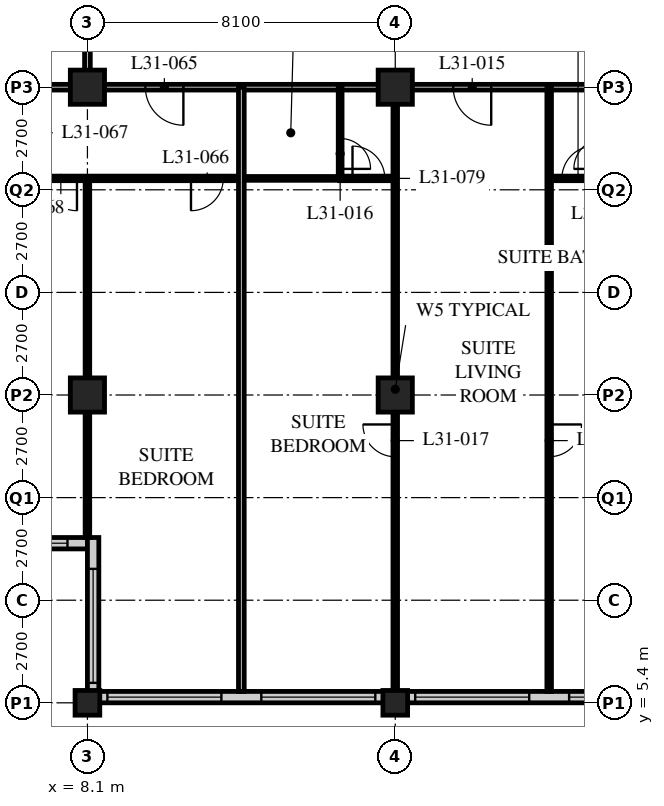
"""IFC4 building model, lengths in metres.
Left out: names, types, materials, properties, quantities, classifications, styles, units other than length and angle.
Written with IfcOpenShell. Run it as: python <this file> out.ifc"""

import sys

from ifc_helpers import new_model, si_unit, direction, frame, frame_2d, origin, origin_2d, place, context, subcontext, project, spatial, rectangle, hollow_rectangle, extrude, element, fill, save


model = new_model("IFC4")
c1 = context("Model", 3, precision=1e-05, world=origin(), true_north=direction((0.0, 1.0)))
c2 = subcontext(c1, "Body", "Model", "MODEL_VIEW")
j1 = project(units=[si_unit("LENGTHUNIT", "METRE"), si_unit("PLANEANGLEUNIT", "RADIAN")], contexts=[c1])
p1 = place(None, origin())
s1 = spatial("IfcSite", under=j1, at=p1, CompositionType="ELEMENT")
p2 = place(p1, origin())
s2 = spatial("IfcBuilding", under=s1, at=p2, CompositionType="ELEMENT")
p3 = place(p2, frame((0.0, 0.0, 123.8)))
s3 = spatial("IfcBuildingStorey", under=s2, at=p3, CompositionType="ELEMENT", Elevation=123.8)
p4 = place(p3, frame((8.1, 5.4, 0.0), z_axis=(0.0, 0.0, 1.0), x_axis=(1.0, 0.0, 0.0)))
e1 = element("IfcColumn", 1, at=p4, inside=s3, PredefinedType="COLUMN", context=c2, shape_type="SweptSolid", body=[
    extrude(hollow_rectangle(XDim=0.65, YDim=0.65, WallThickness=0.055, at=origin_2d()), origin(), (0.0, 0.0, 1.0), 3.4),
])
for number, where, z_axis, x_axis in (
    (2, (8.1, 13.5, 0.0), (0.0, 0.0, 1.0), (1.0, 0.0, 0.0)),
    (3, (8.1, 21.6, 0.0), (0.0, 0.0, 1.0), (1.0, 0.0, 0.0)),
):
    element("IfcColumn", number, at=place(p3, frame(where, z_axis=z_axis, x_axis=x_axis)), inside=s3, PredefinedType="COLUMN", context=c2, shape_type="SweptSolid", body=[
        extrude(hollow_rectangle(XDim=0.9, YDim=0.9, WallThickness=0.09, at=origin_2d()), origin(), (0.0, 0.0, 1.0), 3.4),
    ])
p5 = place(p3, frame((16.2, 5.4, 0.0), z_axis=(0.0, 0.0, 1.0), x_axis=(1.0, 0.0, 0.0)))
e4 = element("IfcColumn", 4, at=p5, inside=s3, PredefinedType="COLUMN", context=c2, shape_type="SweptSolid", body=[
    extrude(hollow_rectangle(XDim=0.65, YDim=0.65, WallThickness=0.055, at=origin_2d()), origin(), (0.0, 0.0, 1.0), 3.4),
])
for number, where, z_axis, x_axis in (
    (5, (16.2, 13.5, 0.0), (0.0, 0.0, 1.0), (1.0, 0.0, 0.0)),
    (6, (16.2, 21.6, 0.0), (0.0, 0.0, 1.0), (1.0, 0.0, 0.0)),
):
    element("IfcColumn", number, at=place(p3, frame(where, z_axis=z_axis, x_axis=x_axis)), inside=s3, PredefinedType="COLUMN", context=c2, shape_type="SweptSolid", body=[
        extrude(hollow_rectangle(XDim=0.9, YDim=0.9, WallThickness=0.09, at=origin_2d()), origin(), (0.0, 0.0, 1.0), 3.4),
    ])
p6 = place(p3, frame((8.4, 5.55, 0.0), z_axis=(0.0, 0.0, 1.0), x_axis=(1.0, 0.0, 0.0)))
e7 = element("IfcWall", 7, at=p6, inside=s3, PredefinedType="SOLIDWALL", context=c2, shape_type="SweptSolid", body=[
    extrude(rectangle(XDim=40.2, YDim=0.3, at=frame_2d((20.1, 0.0))), origin(), (0.0, 0.0, 1.0), 3.19),
])
p7 = place(p6, frame((0.225, 0.0, 0.9)))
e8 = element("IfcOpeningElement", 8, at=p7, cuts=e7, PredefinedType="OPENING", context=c2, shape_type="SweptSolid", body=[
    extrude(rectangle(XDim=3.0, YDim=2.0, at=frame_2d((1.5, 1.0))), frame((0.0, 0.16, 0.0), z_axis=(0.0, -1.0, 0.0), x_axis=(1.0, 0.0, 0.0)), (0.0, 0.0, 1.0), 0.32),
])
p8 = place(p6, frame((4.275, 0.0, 0.9)))
e9 = element("IfcOpeningElement", 9, at=p8, cuts=e7, PredefinedType="OPENING", context=c2, shape_type="SweptSolid", body=[
    extrude(rectangle(XDim=3.0, YDim=2.0, at=frame_2d((1.5, 1.0))), frame((0.0, 0.16, 0.0), z_axis=(0.0, -1.0, 0.0), x_axis=(1.0, 0.0, 0.0)), (0.0, 0.0, 1.0), 0.32),
])
p9 = place(p6, frame((8.325, 0.0, 0.9)))
e10 = element("IfcOpeningElement", 10, at=p9, cuts=e7, PredefinedType="OPENING", context=c2, shape_type="SweptSolid", body=[
    extrude(rectangle(XDim=3.0, YDim=2.0, at=frame_2d((1.5, 1.0))), frame((0.0, 0.16, 0.0), z_axis=(0.0, -1.0, 0.0), x_axis=(1.0, 0.0, 0.0)), (0.0, 0.0, 1.0), 0.32),
])
p10 = place(p6, frame((12.375, 0.0, 0.9)))
e11 = element("IfcOpeningElement", 11, at=p10, cuts=e7, PredefinedType="OPENING", context=c2, shape_type="SweptSolid", body=[
    extrude(rectangle(XDim=3.0, YDim=2.0, at=frame_2d((1.5, 1.0))), frame((0.0, 0.16, 0.0), z_axis=(0.0, -1.0, 0.0), x_axis=(1.0, 0.0, 0.0)), (0.0, 0.0, 1.0), 0.32),
])
p11 = place(p6, frame((16.425, 0.0, 0.9)))
e12 = element("IfcOpeningElement", 12, at=p11, cuts=e7, PredefinedType="OPENING", context=c2, shape_type="SweptSolid", body=[
    extrude(rectangle(XDim=3.0, YDim=2.0, at=frame_2d((1.5, 1.0))), frame((0.0, 0.16, 0.0), z_axis=(0.0, -1.0, 0.0), x_axis=(1.0, 0.0, 0.0)), (0.0, 0.0, 1.0), 0.32),
])
p12 = place(p6, frame((20.475, 0.0, 0.9)))
e13 = element("IfcOpeningElement", 13, at=p12, cuts=e7, PredefinedType="OPENING", context=c2, shape_type="SweptSolid", body=[
    extrude(rectangle(XDim=3.0, YDim=2.0, at=frame_2d((1.5, 1.0))), frame((0.0, 0.16, 0.0), z_axis=(0.0, -1.0, 0.0), x_axis=(1.0, 0.0, 0.0)), (0.0, 0.0, 1.0), 0.32),
])
p13 = place(p6, frame((24.525, 0.0, 0.9)))
e14 = element("IfcOpeningElement", 14, at=p13, cuts=e7, PredefinedType="OPENING", context=c2, shape_type="SweptSolid", body=[
    extrude(rectangle(XDim=3.0, YDim=2.0, at=frame_2d((1.5, 1.0))), frame((0.0, 0.16, 0.0), z_axis=(0.0, -1.0, 0.0), x_axis=(1.0, 0.0, 0.0)), (0.0, 0.0, 1.0), 0.32),
])
p14 = place(p6, frame((28.575, 0.0, 0.9)))
e15 = element("IfcOpeningElement", 15, at=p14, cuts=e7, PredefinedType="OPENING", context=c2, shape_type="SweptSolid", body=[
    extrude(rectangle(XDim=3.0, YDim=2.0, at=frame_2d((1.5, 1.0))), frame((0.0, 0.16, 0.0), z_axis=(0.0, -1.0, 0.0), x_axis=(1.0, 0.0, 0.0)), (0.0, 0.0, 1.0), 0.32),
])
p15 = place(p6, frame((32.625, 0.0, 0.9)))
e16 = element("IfcOpeningElement", 16, at=p15, cuts=e7, PredefinedType="OPENING", context=c2, shape_type="SweptSolid", body=[
    extrude(rectangle(XDim=3.0, YDim=2.0, at=frame_2d((1.5, 1.0))), frame((0.0, 0.16, 0.0), z_axis=(0.0, -1.0, 0.0), x_axis=(1.0, 0.0, 0.0)), (0.0, 0.0, 1.0), 0.32),
])
p16 = place(p6, frame((36.675, 0.0, 0.9)))
e17 = element("IfcOpeningElement", 17, at=p16, cuts=e7, PredefinedType="OPENING", context=c2, shape_type="SweptSolid", body=[
    extrude(rectangle(XDim=3.0, YDim=2.0, at=frame_2d((1.5, 1.0))), frame((0.0, 0.16, 0.0), z_axis=(0.0, -1.0, 0.0), x_axis=(1.0, 0.0, 0.0)), (0.0, 0.0, 1.0), 0.32),
])
p17 = place(p3, frame((4.35, 9.6, 0.0), z_axis=(0.0, 0.0, 1.0), x_axis=(1.0, 0.0, 0.0)))
e18 = element("IfcWall", 18, at=p17, inside=s3, PredefinedType="SOLIDWALL", context=c2, shape_type="SweptSolid", body=[
    extrude(rectangle(XDim=3.75, YDim=0.3, at=frame_2d((1.875, 0.0))), origin(), (0.0, 0.0, 1.0), 3.19),
])
p18 = place(p17, frame((0.225, 0.0, 0.9)))
e19 = element("IfcOpeningElement", 19, at=p18, cuts=e18, PredefinedType="OPENING", context=c2, shape_type="SweptSolid", body=[
    extrude(rectangle(XDim=3.0, YDim=1.5, at=frame_2d((1.5, 0.75))), frame((0.0, 0.16, 0.0), z_axis=(0.0, -1.0, 0.0), x_axis=(1.0, 0.0, 0.0)), (0.0, 0.0, 1.0), 0.32),
])
p19 = place(p3, frame((8.25, 9.75, 0.0), z_axis=(0.0, 0.0, 1.0), x_axis=(0.0, -1.0, 0.0)))
e20 = element("IfcWall", 20, at=p19, inside=s3, PredefinedType="SOLIDWALL", context=c2, shape_type="SweptSolid", body=[
    extrude(rectangle(XDim=4.35, YDim=0.3, at=frame_2d((2.175, 0.0))), origin(), (0.0, 0.0, 1.0), 3.19),
])
p20 = place(p19, frame((0.825, 0.0, 0.9)))
e21 = element("IfcOpeningElement", 21, at=p20, cuts=e20, PredefinedType="OPENING", context=c2, shape_type="SweptSolid", body=[
    extrude(rectangle(XDim=3.0, YDim=1.5, at=frame_2d((1.5, 0.75))), frame((0.0, 0.16, 0.0), z_axis=(0.0, -1.0, 0.0), x_axis=(1.0, 0.0, 0.0)), (0.0, 0.0, 1.0), 0.32),
])
p21 = place(p3, frame((8.1, 21.6, 0.0), z_axis=(0.0, 0.0, 1.0), x_axis=(1.0, 0.0, 0.0)))
e22 = element("IfcWall", 22, at=p21, inside=s3, PredefinedType="PARTITIONING", context=c2, shape_type="SweptSolid", body=[
    extrude(rectangle(XDim=40.5, YDim=0.15, at=frame_2d((20.25, 0.0))), origin(), (0.0, 0.0, 1.0), 2.578),
])
p22 = place(p21, frame((9.625, 0.0, 0.0)))
e23 = element("IfcOpeningElement", 23, at=p22, cuts=e22, PredefinedType="OPENING", context=c2, shape_type="SweptSolid", body=[
    extrude(rectangle(XDim=1.0, YDim=2.1, at=frame_2d((0.5, 1.05))), frame((0.0, 0.085, 0.0), z_axis=(0.0, -1.0, 0.0), x_axis=(1.0, 0.0, 0.0)), (0.0, 0.0, 1.0), 0.17),
])
p23 = place(p21, frame((21.775, 0.0, 0.0)))
e24 = element("IfcOpeningElement", 24, at=p23, cuts=e22, PredefinedType="OPENING", context=c2, shape_type="SweptSolid", body=[
    extrude(rectangle(XDim=1.0, YDim=2.1, at=frame_2d((0.5, 1.05))), frame((0.0, 0.085, 0.0), z_axis=(0.0, -1.0, 0.0), x_axis=(1.0, 0.0, 0.0)), (0.0, 0.0, 1.0), 0.17),
])
p24 = place(p21, frame((28.95, 0.0, 0.0)))
e25 = element("IfcOpeningElement", 25, at=p24, cuts=e22, PredefinedType="OPENING", context=c2, shape_type="SweptSolid", body=[
    extrude(rectangle(XDim=1.0, YDim=2.1, at=frame_2d((0.5, 1.05))), frame((0.0, 0.085, 0.0), z_axis=(0.0, -1.0, 0.0), x_axis=(1.0, 0.0, 0.0)), (0.0, 0.0, 1.0), 0.17),
])
p25 = place(p21, frame((34.85, 0.0, 0.0)))
e26 = element("IfcOpeningElement", 26, at=p25, cuts=e22, PredefinedType="OPENING", context=c2, shape_type="SweptSolid", body=[
    extrude(rectangle(XDim=1.0, YDim=2.1, at=frame_2d((0.5, 1.05))), frame((0.0, 0.085, 0.0), z_axis=(0.0, -1.0, 0.0), x_axis=(1.0, 0.0, 0.0)), (0.0, 0.0, 1.0), 0.17),
])
p26 = place(p21, frame((1.525, 0.0, 0.0)))
e27 = element("IfcOpeningElement", 27, at=p26, cuts=e22, PredefinedType="OPENING", context=c2, shape_type="SweptSolid", body=[
    extrude(rectangle(XDim=1.0, YDim=2.1, at=frame_2d((0.5, 1.05))), frame((0.0, 0.085, 0.0), z_axis=(0.0, -1.0, 0.0), x_axis=(1.0, 0.0, 0.0)), (0.0, 0.0, 1.0), 0.17),
])
p27 = place(p21, frame((37.975, 0.0, 0.0)))
e28 = element("IfcOpeningElement", 28, at=p27, cuts=e22, PredefinedType="OPENING", context=c2, shape_type="SweptSolid", body=[
    extrude(rectangle(XDim=1.0, YDim=2.1, at=frame_2d((0.5, 1.05))), frame((0.0, 0.085, 0.0), z_axis=(0.0, -1.0, 0.0), x_axis=(1.0, 0.0, 0.0)), (0.0, 0.0, 1.0), 0.17),
])
p28 = place(p3, frame((8.1, 21.6, 0.0), z_axis=(0.0, 0.0, 1.0), x_axis=(0.0, 1.0, 0.0)))
e29 = element("IfcWall", 29, at=p28, inside=s3, PredefinedType="PARTITIONING", context=c2, shape_type="SweptSolid", body=[
    extrude(rectangle(XDim=24.3, YDim=0.15, at=frame_2d((12.15, 0.0))), origin(), (0.0, 0.0, 1.0), 2.578),
])
p29 = place(p28, frame((5.45, 0.0, 0.0)))
e30 = element("IfcOpeningElement", 30, at=p29, cuts=e29, PredefinedType="OPENING", context=c2, shape_type="SweptSolid", body=[
    extrude(rectangle(XDim=1.0, YDim=2.1, at=frame_2d((0.5, 1.05))), frame((0.0, 0.085, 0.0), z_axis=(0.0, -1.0, 0.0), x_axis=(1.0, 0.0, 0.0)), (0.0, 0.0, 1.0), 0.17),
])
p30 = place(p28, frame((10.0, 0.0, 0.0)))
e31 = element("IfcOpeningElement", 31, at=p30, cuts=e29, PredefinedType="OPENING", context=c2, shape_type="SweptSolid", body=[
    extrude(rectangle(XDim=1.0, YDim=2.1, at=frame_2d((0.5, 1.05))), frame((0.0, 0.085, 0.0), z_axis=(0.0, -1.0, 0.0), x_axis=(1.0, 0.0, 0.0)), (0.0, 0.0, 1.0), 0.17),
])
p31 = place(p28, frame((21.65, 0.0, 0.0)))
e32 = element("IfcOpeningElement", 32, at=p31, cuts=e29, PredefinedType="OPENING", context=c2, shape_type="SweptSolid", body=[
    extrude(rectangle(XDim=1.0, YDim=2.1, at=frame_2d((0.5, 1.05))), frame((0.0, 0.085, 0.0), z_axis=(0.0, -1.0, 0.0), x_axis=(1.0, 0.0, 0.0)), (0.0, 0.0, 1.0), 0.17),
])
p32 = place(p3, frame((12.15, 19.2, 0.0), z_axis=(0.0, 0.0, 1.0), x_axis=(1.0, 0.0, 0.0)))
e33 = element("IfcWall", 33, at=p32, inside=s3, PredefinedType="PARTITIONING", context=c2, shape_type="SweptSolid", body=[
    extrude(rectangle(XDim=2.6, YDim=0.1, at=frame_2d((1.3, 0.0))), origin(), (0.0, 0.0, 1.0), 3.19),
])
p33 = place(p3, frame((14.75, 21.6, 0.0), z_axis=(0.0, 0.0, 1.0), x_axis=(0.0, -1.0, 0.0)))
e34 = element("IfcWall", 34, at=p33, inside=s3, PredefinedType="PARTITIONING", context=c2, shape_type="SweptSolid", body=[
    extrude(rectangle(XDim=2.4, YDim=0.1, at=frame_2d((1.2, 0.0))), origin(), (0.0, 0.0, 1.0), 3.19),
])
p34 = place(p33, frame((1.35, 0.0, 0.0)))
e35 = element("IfcOpeningElement", 35, at=p34, cuts=e34, PredefinedType="OPENING", context=c2, shape_type="SweptSolid", body=[
    extrude(rectangle(XDim=0.8, YDim=2.1, at=frame_2d((0.4, 1.05))), frame((0.0, 0.06, 0.0), z_axis=(0.0, -1.0, 0.0), x_axis=(1.0, 0.0, 0.0)), (0.0, 0.0, 1.0), 0.12),
])
p35 = place(p3, frame((16.2, 21.6, 0.0), z_axis=(0.0, 0.0, 1.0), x_axis=(0.0, -1.0, 0.0)))
e36 = element("IfcWall", 36, at=p35, inside=s3, PredefinedType="PARTITIONING", context=c2, shape_type="SweptSolid", body=[
    extrude(rectangle(XDim=15.9, YDim=0.12, at=frame_2d((7.95, 0.0))), origin(), (0.0, 0.0, 1.0), 2.578),
])
p36 = place(p35, frame((8.875, 0.0, 0.0)))
e37 = element("IfcOpeningElement", 37, at=p36, cuts=e36, PredefinedType="OPENING", context=c2, shape_type="SweptSolid", body=[
    extrude(rectangle(XDim=0.85, YDim=2.1, at=frame_2d((0.425, 1.05))), frame((0.0, 0.07, 0.0), z_axis=(0.0, -1.0, 0.0), x_axis=(1.0, 0.0, 0.0)), (0.0, 0.0, 1.0), 0.14),
])
p37 = place(p3, frame((20.25, 21.6, 0.0), z_axis=(0.0, 0.0, 1.0), x_axis=(0.0, -1.0, 0.0)))
e38 = element("IfcWall", 38, at=p37, inside=s3, PredefinedType="PARTITIONING", context=c2, shape_type="SweptSolid", body=[
    extrude(rectangle(XDim=15.9, YDim=0.12, at=frame_2d((7.95, 0.0))), origin(), (0.0, 0.0, 1.0), 3.19),
])
p38 = place(p37, frame((8.875, 0.0, 0.0)))
e39 = element("IfcOpeningElement", 39, at=p38, cuts=e38, PredefinedType="OPENING", context=c2, shape_type="SweptSolid", body=[
    extrude(rectangle(XDim=0.85, YDim=2.1, at=frame_2d((0.425, 1.05))), frame((0.0, 0.07, 0.0), z_axis=(0.0, -1.0, 0.0), x_axis=(1.0, 0.0, 0.0)), (0.0, 0.0, 1.0), 0.14),
])
p39 = place(p3, frame((4.1, 19.2, 0.0), z_axis=(0.0, 0.0, 1.0), x_axis=(1.0, 0.0, 0.0)))
e40 = element("IfcWall", 40, at=p39, inside=s3, PredefinedType="PARTITIONING", context=c2, shape_type="SweptSolid", body=[
    extrude(rectangle(XDim=8.05, YDim=0.12, at=frame_2d((4.025, 0.0))), origin(), (0.0, 0.0, 1.0), 3.19),
])
p40 = place(p39, frame((6.725, 0.0, 0.0)))
e41 = element("IfcOpeningElement", 41, at=p40, cuts=e40, PredefinedType="OPENING", context=c2, shape_type="SweptSolid", body=[
    extrude(rectangle(XDim=0.85, YDim=2.1, at=frame_2d((0.425, 1.05))), frame((0.0, 0.07, 0.0), z_axis=(0.0, -1.0, 0.0), x_axis=(1.0, 0.0, 0.0)), (0.0, 0.0, 1.0), 0.14),
])
p41 = place(p39, frame((2.875, 0.0, 0.0)))
e42 = element("IfcOpeningElement", 42, at=p41, cuts=e40, PredefinedType="OPENING", context=c2, shape_type="SweptSolid", body=[
    extrude(rectangle(XDim=0.85, YDim=2.1, at=frame_2d((0.425, 1.05))), frame((0.0, 0.07, 0.0), z_axis=(0.0, -1.0, 0.0), x_axis=(1.0, 0.0, 0.0)), (0.0, 0.0, 1.0), 0.14),
])
p42 = place(p3, frame((8.1, 19.2, 0.0), z_axis=(0.0, 0.0, 1.0), x_axis=(0.0, -1.0, 0.0)))
e43 = element("IfcWall", 43, at=p42, inside=s3, PredefinedType="PARTITIONING", context=c2, shape_type="SweptSolid", body=[
    extrude(rectangle(XDim=9.45, YDim=0.12, at=frame_2d((4.725, 0.0))), origin(), (0.0, 0.0, 1.0), 2.578),
])
p43 = place(p3, frame((0.3, 21.6, 0.0), z_axis=(0.0, 0.0, 1.0), x_axis=(1.0, 0.0, 0.0)))
e44 = element("IfcWall", 44, at=p43, inside=s3, PredefinedType="PARTITIONING", context=c2, shape_type="SweptSolid", body=[
    extrude(rectangle(XDim=7.8, YDim=0.15, at=frame_2d((3.9, 0.0))), origin(), (0.0, 0.0, 1.0), 2.578),
])
p44 = place(p3, frame((12.15, 21.6, 0.0), z_axis=(0.0, 0.0, 1.0), x_axis=(0.0, -1.0, 0.0)))
e45 = element("IfcWall", 45, at=p44, inside=s3, PredefinedType="PARTITIONING", context=c2, shape_type="SweptSolid", body=[
    extrude(rectangle(XDim=15.9, YDim=0.15, at=frame_2d((7.95, 0.0))), origin(), (0.0, 0.0, 1.0), 3.19),
])
p45 = place(p3, frame((16.2, 19.2, 0.0), z_axis=(0.0, 0.0, 1.0), x_axis=(-1.0, 0.0, 0.0)))
e46 = element("IfcWall", 46, at=p45, inside=s3, PredefinedType="PARTITIONING", context=c2, shape_type="SweptSolid", body=[
    extrude(rectangle(XDim=1.46, YDim=0.12, at=frame_2d((0.73, 0.0))), origin(), (0.0, 0.0, 1.0), 3.19),
])
p46 = place(p45, frame((0.275, 0.0, 0.0)))
e47 = element("IfcOpeningElement", 47, at=p46, cuts=e46, PredefinedType="OPENING", context=c2, shape_type="SweptSolid", body=[
    extrude(rectangle(XDim=0.85, YDim=2.1, at=frame_2d((0.425, 1.05))), frame((0.0, 0.07, 0.0), z_axis=(0.0, -1.0, 0.0), x_axis=(1.0, 0.0, 0.0)), (0.0, 0.0, 1.0), 0.14),
])
p47 = place(p3, frame((21.71, 19.2, 0.0), z_axis=(0.0, 0.0, 1.0), x_axis=(-1.0, 0.0, 0.0)))
e48 = element("IfcWall", 48, at=p47, inside=s3, PredefinedType="PARTITIONING", context=c2, shape_type="SweptSolid", body=[
    extrude(rectangle(XDim=1.46, YDim=0.12, at=frame_2d((0.73, 0.0))), origin(), (0.0, 0.0, 1.0), 3.19),
])
p48 = place(p47, frame((0.275, 0.0, 0.0)))
e49 = element("IfcOpeningElement", 49, at=p48, cuts=e48, PredefinedType="OPENING", context=c2, shape_type="SweptSolid", body=[
    extrude(rectangle(XDim=0.85, YDim=2.1, at=frame_2d((0.425, 1.05))), frame((0.0, 0.07, 0.0), z_axis=(0.0, -1.0, 0.0), x_axis=(1.0, 0.0, 0.0)), (0.0, 0.0, 1.0), 0.14),
])
p49 = place(p7, origin())
e50 = element("IfcWindow", 50, at=p49, inside=s3, PartitioningType="SINGLE_PANEL", PredefinedType="WINDOW", context=c2, shape_type="SweptSolid", body=[
    extrude(rectangle(XDim=3.0, YDim=2.0, at=frame_2d((1.5, 1.0))), frame((0.0, 0.03, 0.0), z_axis=(0.0, -1.0, 0.0), x_axis=(1.0, 0.0, 0.0)), (0.0, 0.0, 1.0), 0.06),
])
fill(e8, e50)
p50 = place(p8, origin())
e51 = element("IfcWindow", 51, at=p50, inside=s3, PartitioningType="SINGLE_PANEL", PredefinedType="WINDOW", context=c2, shape_type="SweptSolid", body=[
    extrude(rectangle(XDim=3.0, YDim=2.0, at=frame_2d((1.5, 1.0))), frame((0.0, 0.03, 0.0), z_axis=(0.0, -1.0, 0.0), x_axis=(1.0, 0.0, 0.0)), (0.0, 0.0, 1.0), 0.06),
])
fill(e9, e51)
p51 = place(p9, origin())
e52 = element("IfcWindow", 52, at=p51, inside=s3, PartitioningType="SINGLE_PANEL", PredefinedType="WINDOW", context=c2, shape_type="SweptSolid", body=[
    extrude(rectangle(XDim=3.0, YDim=2.0, at=frame_2d((1.5, 1.0))), frame((0.0, 0.03, 0.0), z_axis=(0.0, -1.0, 0.0), x_axis=(1.0, 0.0, 0.0)), (0.0, 0.0, 1.0), 0.06),
])
fill(e10, e52)
p52 = place(p10, origin())
e53 = element("IfcWindow", 53, at=p52, inside=s3, PartitioningType="SINGLE_PANEL", PredefinedType="WINDOW", context=c2, shape_type="SweptSolid", body=[
    extrude(rectangle(XDim=3.0, YDim=2.0, at=frame_2d((1.5, 1.0))), frame((0.0, 0.03, 0.0), z_axis=(0.0, -1.0, 0.0), x_axis=(1.0, 0.0, 0.0)), (0.0, 0.0, 1.0), 0.06),
])
fill(e11, e53)
p53 = place(p18, origin())
e54 = element("IfcWindow", 54, at=p53, inside=s3, PartitioningType="SINGLE_PANEL", PredefinedType="WINDOW", context=c2, shape_type="SweptSolid", body=[
    extrude(rectangle(XDim=3.0, YDim=1.5, at=frame_2d((1.5, 0.75))), frame((0.0, 0.03, 0.0), z_axis=(0.0, -1.0, 0.0), x_axis=(1.0, 0.0, 0.0)), (0.0, 0.0, 1.0), 0.06),
])
fill(e19, e54)
p54 = place(p20, origin())
e55 = element("IfcWindow", 55, at=p54, inside=s3, PartitioningType="SINGLE_PANEL", PredefinedType="WINDOW", context=c2, shape_type="SweptSolid", body=[
    extrude(rectangle(XDim=3.0, YDim=1.5, at=frame_2d((1.5, 0.75))), frame((0.0, 0.03, 0.0), z_axis=(0.0, -1.0, 0.0), x_axis=(1.0, 0.0, 0.0)), (0.0, 0.0, 1.0), 0.06),
])
fill(e21, e55)
p55 = place(p22, origin())
e56 = element("IfcDoor", 56, at=p55, inside=s3, OperationType="SINGLE_SWING_LEFT", PredefinedType="DOOR", context=c2, shape_type="SweptSolid", body=[
    extrude(rectangle(XDim=1.0, YDim=2.1, at=frame_2d((0.5, 1.05))), frame((0.0, 0.025, 0.0), z_axis=(0.0, -1.0, 0.0), x_axis=(1.0, 0.0, 0.0)), (0.0, 0.0, 1.0), 0.05),
])
fill(e23, e56)
p56 = place(p34, origin())
e57 = element("IfcDoor", 57, at=p56, inside=s3, OperationType="SINGLE_SWING_RIGHT", PredefinedType="DOOR", context=c2, shape_type="SweptSolid", body=[
    extrude(rectangle(XDim=0.8, YDim=2.1, at=frame_2d((0.4, 1.05))), frame((0.0, 0.025, 0.0), z_axis=(0.0, -1.0, 0.0), x_axis=(1.0, 0.0, 0.0)), (0.0, 0.0, 1.0), 0.05),
])
fill(e35, e57)
p57 = place(p36, origin())
e58 = element("IfcDoor", 58, at=p57, inside=s3, OperationType="SINGLE_SWING_RIGHT", PredefinedType="DOOR", context=c2, shape_type="SweptSolid", body=[
    extrude(rectangle(XDim=0.85, YDim=2.1, at=frame_2d((0.425, 1.05))), frame((0.0, 0.025, 0.0), z_axis=(0.0, -1.0, 0.0), x_axis=(1.0, 0.0, 0.0)), (0.0, 0.0, 1.0), 0.05),
])
fill(e37, e58)
p58 = place(p38, origin())
e59 = element("IfcDoor", 59, at=p58, inside=s3, OperationType="SINGLE_SWING_LEFT", PredefinedType="DOOR", context=c2, shape_type="SweptSolid", body=[
    extrude(rectangle(XDim=0.85, YDim=2.1, at=frame_2d((0.425, 1.05))), frame((0.0, 0.025, 0.0), z_axis=(0.0, -1.0, 0.0), x_axis=(1.0, 0.0, 0.0)), (0.0, 0.0, 1.0), 0.05),
])
fill(e39, e59)
p59 = place(p26, origin())
e60 = element("IfcDoor", 60, at=p59, inside=s3, OperationType="SINGLE_SWING_LEFT", PredefinedType="DOOR", context=c2, shape_type="SweptSolid", body=[
    extrude(rectangle(XDim=1.0, YDim=2.1, at=frame_2d((0.5, 1.05))), frame((0.0, 0.025, 0.0), z_axis=(0.0, -1.0, 0.0), x_axis=(1.0, 0.0, 0.0)), (0.0, 0.0, 1.0), 0.05),
])
fill(e27, e60)
p60 = place(p40, origin())
e61 = element("IfcDoor", 61, at=p60, inside=s3, OperationType="SINGLE_SWING_RIGHT", PredefinedType="DOOR", context=c2, shape_type="SweptSolid", body=[
    extrude(rectangle(XDim=0.85, YDim=2.1, at=frame_2d((0.425, 1.05))), frame((0.0, 0.025, 0.0), z_axis=(0.0, -1.0, 0.0), x_axis=(1.0, 0.0, 0.0)), (0.0, 0.0, 1.0), 0.05),
])
fill(e41, e61)
p61 = place(p41, origin())
e62 = element("IfcDoor", 62, at=p61, inside=s3, OperationType="SINGLE_SWING_LEFT", PredefinedType="DOOR", context=c2, shape_type="SweptSolid", body=[
    extrude(rectangle(XDim=0.85, YDim=2.1, at=frame_2d((0.425, 1.05))), frame((0.0, 0.025, 0.0), z_axis=(0.0, -1.0, 0.0), x_axis=(1.0, 0.0, 0.0)), (0.0, 0.0, 1.0), 0.05),
])
fill(e42, e62)
p62 = place(p46, origin())
e63 = element("IfcDoor", 63, at=p62, inside=s3, OperationType="SINGLE_SWING_LEFT", PredefinedType="DOOR", context=c2, shape_type="SweptSolid", body=[
    extrude(rectangle(XDim=0.85, YDim=2.1, at=frame_2d((0.425, 1.05))), frame((0.0, 0.025, 0.0), z_axis=(0.0, -1.0, 0.0), x_axis=(1.0, 0.0, 0.0)), (0.0, 0.0, 1.0), 0.05),
])
fill(e47, e63)
p63 = place(p48, origin())
e64 = element("IfcDoor", 64, at=p63, inside=s3, OperationType="SINGLE_SWING_RIGHT", PredefinedType="DOOR", context=c2, shape_type="SweptSolid", body=[
    extrude(rectangle(XDim=0.85, YDim=2.1, at=frame_2d((0.425, 1.05))), frame((0.0, 0.025, 0.0), z_axis=(0.0, -1.0, 0.0), x_axis=(1.0, 0.0, 0.0)), (0.0, 0.0, 1.0), 0.05),
])
fill(e49, e64)
save(model, sys.argv[1])
